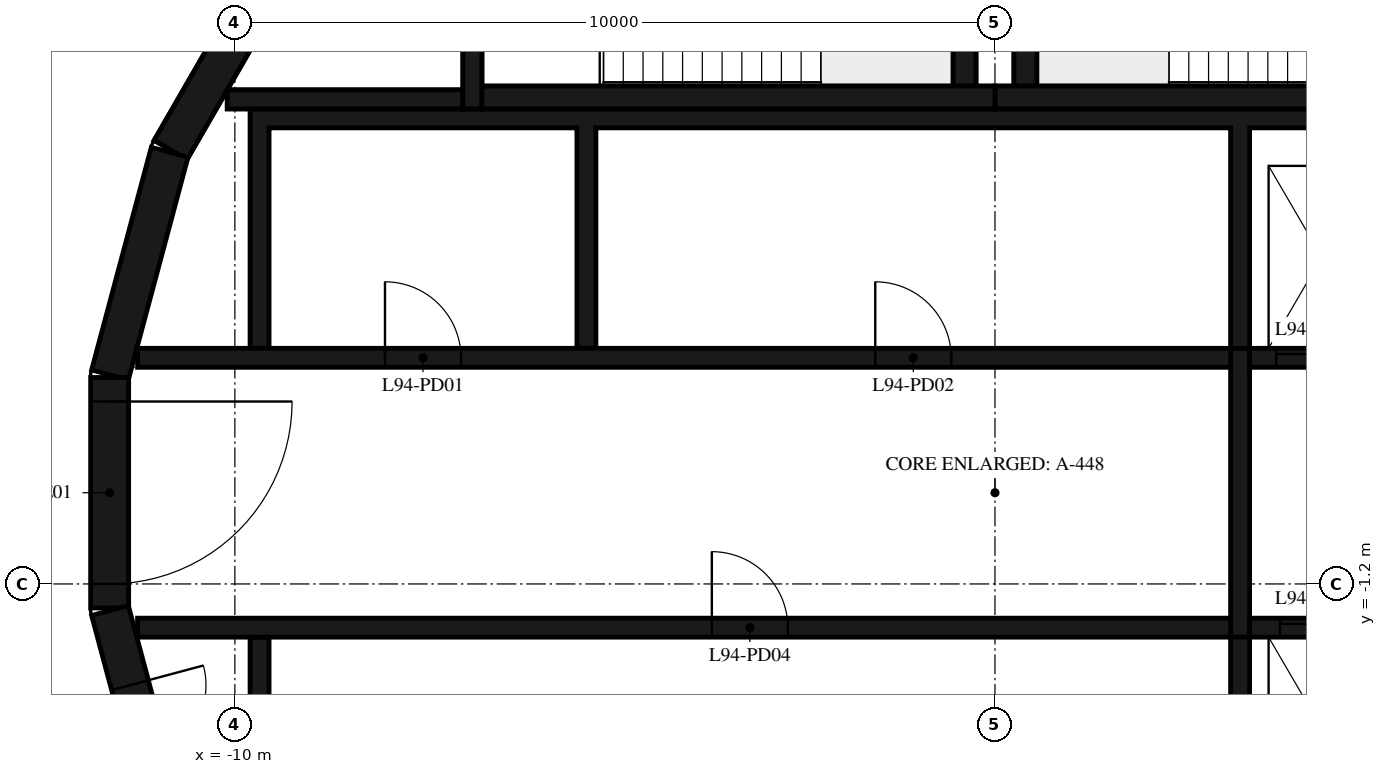
"""IFC4 building model, lengths in metres.
Left out: names, types, materials, properties, quantities, classifications, styles, units other than length and angle.
Written with IfcOpenShell. Run it as: python <this file> out.ifc"""

import sys

from ifc_helpers import new_model, si_unit, direction, frame, frame_2d, origin, place, context, subcontext, project, spatial, polyline, rectangle, outline, extrude, element, fill, save


model = new_model("IFC4")
c1 = context("Model", 3, precision=1e-05, world=origin(), true_north=direction((0.0, 1.0)))
c2 = subcontext(c1, "Body", "Model", "MODEL_VIEW")
j1 = project(units=[si_unit("LENGTHUNIT", "METRE"), si_unit("PLANEANGLEUNIT", "RADIAN")], contexts=[c1])
p1 = place(None, origin())
s1 = spatial("IfcSite", under=j1, at=p1, CompositionType="ELEMENT")
p2 = place(p1, origin())
s2 = spatial("IfcBuilding", under=s1, at=p2, CompositionType="ELEMENT")
p3 = place(p2, frame((0.0, 0.0, 366.2)))
s3 = spatial("IfcBuildingStorey", under=s2, at=p3, CompositionType="ELEMENT", Elevation=366.2)
for number, where, z_axis, x_axis in (
    (1, (-9.329, 7.137, 0.0), (0.0, 0.0, 1.0), (-0.5, -0.866, 0.0)),
    (2, (-10.858, 4.479, 0.0), (0.0, 0.0, 1.0), (-0.259, -0.966, 0.0)),
):
    element("IfcWall", number, at=place(p3, frame(where, z_axis=z_axis, x_axis=x_axis)), inside=s3, PredefinedType="SHEAR", context=c2, shape_type="SweptSolid", body=[
        extrude(rectangle(XDim=3.033, YDim=0.5, at=frame_2d((1.516, 0.0))), origin(), (0.0, 0.0, 1.0), 4.8),
    ])
p4 = place(p3, frame((-11.647, 1.516, 0.0), z_axis=(0.0, 0.0, 1.0), x_axis=(0.0, -1.0, 0.0)))
e3 = element("IfcWall", 3, at=p4, inside=s3, PredefinedType="SHEAR", context=c2, shape_type="SweptSolid", body=[
    extrude(rectangle(XDim=3.033, YDim=0.5, at=frame_2d((1.516, 0.0))), origin(), (0.0, 0.0, 1.0), 4.8),
])
p5 = place(p4, frame((0.316, 0.0, 0.0)))
e4 = element("IfcOpeningElement", 4, at=p5, cuts=e3, PredefinedType="OPENING", context=c2, shape_type="SweptSolid", body=[
    extrude(rectangle(XDim=2.4, YDim=2.1, at=frame_2d((1.2, 1.05))), frame((0.0, 0.26, 0.0), z_axis=(0.0, -1.0, 0.0), x_axis=(1.0, 0.0, 0.0)), (0.0, 0.0, 1.0), 0.52),
])
p6 = place(p3, frame((-11.643, -1.55, 0.0), z_axis=(0.0, 0.0, 1.0), x_axis=(0.258734743916, -0.965948410781, 0.0)))
e5 = element("IfcWall", 5, at=p6, inside=s3, PredefinedType="SHEAR", context=c2, shape_type="SweptSolid", body=[
    extrude(rectangle(XDim=3.033, YDim=0.5, at=frame_2d((1.516, 0.0))), origin(), (0.0, 0.0, 1.0), 4.8),
])
p7 = place(p6, frame((1.016, 0.0, 0.0)))
e6 = element("IfcOpeningElement", 6, at=p7, cuts=e5, PredefinedType="OPENING", context=c2, shape_type="SweptSolid", body=[
    extrude(rectangle(XDim=1.0, YDim=2.4, at=frame_2d((0.5, 1.2))), frame((0.0, 0.26, 0.0), z_axis=(0.0, -1.0, 0.0), x_axis=(1.0, 0.0, 0.0)), (0.0, 0.0, 1.0), 0.52),
])
p8 = place(p3, frame((0.0, 5.2, 0.0), z_axis=(0.0, 0.0, 1.0), x_axis=(1.0, 0.0, 0.0)))
e7 = element("IfcWall", 7, at=p8, inside=s3, PredefinedType="SHEAR", context=c2, shape_type="SweptSolid", body=[
    extrude(rectangle(XDim=6.75, YDim=0.3, at=frame_2d((3.375, 0.0))), origin(), (0.0, 0.0, 1.0), 4.8),
])
p9 = place(p3, frame((0.4, 5.35, 0.0), z_axis=(0.0, 0.0, 1.0), x_axis=(0.0, 1.0, 0.0)))
e8 = element("IfcWall", 8, at=p9, inside=s3, PredefinedType="SHEAR", context=c2, shape_type="SweptSolid", body=[
    extrude(rectangle(XDim=3.32, YDim=0.3, at=frame_2d((1.66, 0.0))), origin(), (0.0, 0.0, 1.0), 4.8),
])
p10 = place(p3, frame((-6.75, 5.2, 0.0), z_axis=(0.0, 0.0, 1.0), x_axis=(1.0, 0.0, 0.0)))
e9 = element("IfcWall", 9, at=p10, inside=s3, PredefinedType="SHEAR", context=c2, shape_type="SweptSolid", body=[
    extrude(rectangle(XDim=6.75, YDim=0.3, at=frame_2d((3.375, 0.0))), origin(), (0.0, 0.0, 1.0), 4.8),
])
p11 = place(p3, frame((-0.4, 5.35, 0.0), z_axis=(0.0, 0.0, 1.0), x_axis=(0.0, 1.0, 0.0)))
e10 = element("IfcWall", 10, at=p11, inside=s3, PredefinedType="SHEAR", context=c2, shape_type="SweptSolid", body=[
    extrude(rectangle(XDim=3.32, YDim=0.3, at=frame_2d((1.66, 0.0))), origin(), (0.0, 0.0, 1.0), 4.8),
])
p12 = place(p3, frame((-6.875, 8.97, 0.0), z_axis=(0.0, 0.0, 1.0), x_axis=(0.0, -1.0, 0.0)))
e11 = element("IfcWall", 11, at=p12, inside=s3, PredefinedType="SHEAR", context=c2, shape_type="SweptSolid", body=[
    extrude(rectangle(XDim=3.92, YDim=0.25, at=frame_2d((1.96, 0.0))), origin(), (0.0, 0.0, 1.0), 4.8),
])
p13 = place(p12, frame((1.61, 0.0, 0.0)))
e12 = element("IfcOpeningElement", 12, at=p13, cuts=e11, PredefinedType="OPENING", context=c2, shape_type="SweptSolid", body=[
    extrude(rectangle(XDim=1.2, YDim=2.1, at=frame_2d((0.6, 1.05))), frame((0.0, 0.135, 0.0), z_axis=(0.0, -1.0, 0.0), x_axis=(1.0, 0.0, 0.0)), (0.0, 0.0, 1.0), 0.27),
])
p14 = place(p3, frame((-7.0, 5.175, 0.0), z_axis=(0.0, 0.0, 1.0), x_axis=(-1.0, 0.0, 0.0)))
e13 = element("IfcWall", 13, at=p14, inside=s3, PredefinedType="SHEAR", context=c2, shape_type="SweptSolid", body=[
    extrude(rectangle(XDim=3.1, YDim=0.25, at=frame_2d((1.55, 0.0))), origin(), (0.0, 0.0, 1.0), 4.8),
])
p15 = place(p3, origin())
e14 = element("IfcWall", 14, at=p15, inside=s3, PredefinedType="SHEAR", context=c2, shape_type="SweptSolid", body=[
    extrude(outline(polyline([(-9.8, 1.9), (-9.55, 1.9), (-9.55, 4.8), (-5.5, 4.8), (-5.5, 1.9), (-5.25, 1.9), (-5.25, 4.8), (3.1, 4.8), (3.1, 1.9), (3.35, 1.9), (3.35, 4.8), (5.25, 4.8), (5.25, 1.9), (5.5, 1.9), (5.5, 4.8), (7.4, 4.8), (7.4, 1.9), (7.65, 1.9), (7.65, 4.8), (9.55, 4.8), (9.55, 1.9), (9.8, 1.9), (9.8, 4.8), (9.8, 5.05), (-9.8, 5.05), (-9.8, 4.8), (-9.8, 1.9)])), origin(), (0.0, 0.0, 1.0), 4.8),
])
p16 = place(p3, origin())
e15 = element("IfcWall", 15, at=p16, inside=s3, PredefinedType="SHEAR", context=c2, shape_type="SweptSolid", body=[
    extrude(outline(polyline([(9.8, -4.8), (9.8, -1.9), (9.55, -1.9), (9.55, -4.8), (7.65, -4.8), (7.65, -1.9), (7.4, -1.9), (7.4, -4.8), (5.5, -4.8), (5.5, -1.9), (5.25, -1.9), (5.25, -4.8), (3.35, -4.8), (3.35, -1.9), (3.1, -1.9), (3.1, -4.8), (-9.55, -4.8), (-9.55, -1.9), (-9.8, -1.9), (-9.8, -4.8), (-9.8, -5.05), (9.8, -5.05), (9.8, -4.8)])), origin(), (0.0, 0.0, 1.0), 4.8),
])
p17 = place(p3, frame((-11.28, 1.775, 0.0), z_axis=(0.0, 0.0, 1.0), x_axis=(1.0, 0.0, 0.0)))
e16 = element("IfcWall", 16, at=p17, inside=s3, PredefinedType="SHEAR", context=c2, shape_type="SweptSolid", body=[
    extrude(rectangle(XDim=14.38, YDim=0.25, at=frame_2d((7.19, 0.0))), origin(), (0.0, 0.0, 1.0), 4.8),
])
p18 = place(p17, frame((3.255, 0.0, 0.0)))
e17 = element("IfcOpeningElement", 17, at=p18, cuts=e16, PredefinedType="OPENING", context=c2, shape_type="SweptSolid", body=[
    extrude(rectangle(XDim=1.0, YDim=2.4, at=frame_2d((0.5, 1.2))), frame((0.0, 0.135, 0.0), z_axis=(0.0, -1.0, 0.0), x_axis=(1.0, 0.0, 0.0)), (0.0, 0.0, 1.0), 0.27),
])
p19 = place(p17, frame((9.705, 0.0, 0.0)))
e18 = element("IfcOpeningElement", 18, at=p19, cuts=e16, PredefinedType="OPENING", context=c2, shape_type="SweptSolid", body=[
    extrude(rectangle(XDim=1.0, YDim=2.4, at=frame_2d((0.5, 1.2))), frame((0.0, 0.135, 0.0), z_axis=(0.0, -1.0, 0.0), x_axis=(1.0, 0.0, 0.0)), (0.0, 0.0, 1.0), 0.27),
])
p20 = place(p3, frame((3.35, 1.775, 0.0), z_axis=(0.0, 0.0, 1.0), x_axis=(1.0, 0.0, 0.0)))
e19 = element("IfcWall", 19, at=p20, inside=s3, PredefinedType="SHEAR", context=c2, shape_type="SweptSolid", body=[
    extrude(rectangle(XDim=7.93, YDim=0.25, at=frame_2d((3.965, 0.0))), origin(), (0.0, 0.0, 1.0), 4.8),
])
p21 = place(p20, frame((0.35, 0.0, 0.0)))
e20 = element("IfcOpeningElement", 20, at=p21, cuts=e19, PredefinedType="OPENING", context=c2, shape_type="SweptSolid", body=[
    extrude(rectangle(XDim=1.2, YDim=2.4, at=frame_2d((0.6, 1.2))), frame((0.0, 0.135, 0.0), z_axis=(0.0, -1.0, 0.0), x_axis=(1.0, 0.0, 0.0)), (0.0, 0.0, 1.0), 0.27),
])
p22 = place(p20, frame((2.5, 0.0, 0.0)))
e21 = element("IfcOpeningElement", 21, at=p22, cuts=e19, PredefinedType="OPENING", context=c2, shape_type="SweptSolid", body=[
    extrude(rectangle(XDim=1.2, YDim=2.4, at=frame_2d((0.6, 1.2))), frame((0.0, 0.135, 0.0), z_axis=(0.0, -1.0, 0.0), x_axis=(1.0, 0.0, 0.0)), (0.0, 0.0, 1.0), 0.27),
])
p23 = place(p20, frame((4.75, 0.0, 0.0)))
e22 = element("IfcOpeningElement", 22, at=p23, cuts=e19, PredefinedType="OPENING", context=c2, shape_type="SweptSolid", body=[
    extrude(rectangle(XDim=1.0, YDim=2.4, at=frame_2d((0.5, 1.2))), frame((0.0, 0.135, 0.0), z_axis=(0.0, -1.0, 0.0), x_axis=(1.0, 0.0, 0.0)), (0.0, 0.0, 1.0), 0.27),
])
p24 = place(p3, frame((-11.28, -1.775, 0.0), z_axis=(0.0, 0.0, 1.0), x_axis=(1.0, 0.0, 0.0)))
e23 = element("IfcWall", 23, at=p24, inside=s3, PredefinedType="SHEAR", context=c2, shape_type="SweptSolid", body=[
    extrude(rectangle(XDim=14.38, YDim=0.25, at=frame_2d((7.19, 0.0))), origin(), (0.0, 0.0, 1.0), 4.8),
])
p25 = place(p24, frame((7.555, 0.0, 0.0)))
e24 = element("IfcOpeningElement", 24, at=p25, cuts=e23, PredefinedType="OPENING", context=c2, shape_type="SweptSolid", body=[
    extrude(rectangle(XDim=1.0, YDim=2.4, at=frame_2d((0.5, 1.2))), frame((0.0, 0.135, 0.0), z_axis=(0.0, -1.0, 0.0), x_axis=(1.0, 0.0, 0.0)), (0.0, 0.0, 1.0), 0.27),
])
p26 = place(p3, frame((3.35, -1.775, 0.0), z_axis=(0.0, 0.0, 1.0), x_axis=(1.0, 0.0, 0.0)))
e25 = element("IfcWall", 25, at=p26, inside=s3, PredefinedType="SHEAR", context=c2, shape_type="SweptSolid", body=[
    extrude(rectangle(XDim=7.93, YDim=0.25, at=frame_2d((3.965, 0.0))), origin(), (0.0, 0.0, 1.0), 4.8),
])
p27 = place(p26, frame((0.4, 0.0, 0.0)))
e26 = element("IfcOpeningElement", 26, at=p27, cuts=e25, PredefinedType="OPENING", context=c2, shape_type="SweptSolid", body=[
    extrude(rectangle(XDim=1.1, YDim=2.4, at=frame_2d((0.55, 1.2))), frame((0.0, 0.135, 0.0), z_axis=(0.0, -1.0, 0.0), x_axis=(1.0, 0.0, 0.0)), (0.0, 0.0, 1.0), 0.27),
])
p28 = place(p26, frame((2.55, 0.0, 0.0)))
e27 = element("IfcOpeningElement", 27, at=p28, cuts=e25, PredefinedType="OPENING", context=c2, shape_type="SweptSolid", body=[
    extrude(rectangle(XDim=1.1, YDim=2.4, at=frame_2d((0.55, 1.2))), frame((0.0, 0.135, 0.0), z_axis=(0.0, -1.0, 0.0), x_axis=(1.0, 0.0, 0.0)), (0.0, 0.0, 1.0), 0.27),
])
p29 = place(p26, frame((4.7, 0.0, 0.0)))
e28 = element("IfcOpeningElement", 28, at=p29, cuts=e25, PredefinedType="OPENING", context=c2, shape_type="SweptSolid", body=[
    extrude(rectangle(XDim=1.1, YDim=2.4, at=frame_2d((0.55, 1.2))), frame((0.0, 0.135, 0.0), z_axis=(0.0, -1.0, 0.0), x_axis=(1.0, 0.0, 0.0)), (0.0, 0.0, 1.0), 0.27),
])
p30 = place(p3, frame((3.225, -1.9, 0.0), z_axis=(0.0, 0.0, 1.0), x_axis=(0.0, 1.0, 0.0)))
e29 = element("IfcWall", 29, at=p30, inside=s3, PredefinedType="SHEAR", context=c2, shape_type="SweptSolid", body=[
    extrude(rectangle(XDim=3.8, YDim=0.25, at=frame_2d((1.9, 0.0))), origin(), (0.0, 0.0, 1.0), 4.8),
])
p31 = place(p3, frame((0.0, 5.2, 5.2), z_axis=(0.0, 0.0, 1.0), x_axis=(1.0, 0.0, 0.0)))
e30 = element("IfcWall", 30, at=p31, inside=s3, PredefinedType="SHEAR", context=c2, shape_type="SweptSolid", body=[
    extrude(rectangle(XDim=6.75, YDim=0.3, at=frame_2d((3.375, 0.0))), origin(), (0.0, 0.0, 1.0), 2.8),
])
p32 = place(p3, frame((0.4, 5.35, 5.2), z_axis=(0.0, 0.0, 1.0), x_axis=(0.0, 1.0, 0.0)))
e31 = element("IfcWall", 31, at=p32, inside=s3, PredefinedType="SHEAR", context=c2, shape_type="SweptSolid", body=[
    extrude(rectangle(XDim=3.32, YDim=0.3, at=frame_2d((1.66, 0.0))), origin(), (0.0, 0.0, 1.0), 2.8),
])
p33 = place(p3, frame((-6.75, 5.2, 5.2), z_axis=(0.0, 0.0, 1.0), x_axis=(1.0, 0.0, 0.0)))
e32 = element("IfcWall", 32, at=p33, inside=s3, PredefinedType="SHEAR", context=c2, shape_type="SweptSolid", body=[
    extrude(rectangle(XDim=6.75, YDim=0.3, at=frame_2d((3.375, 0.0))), origin(), (0.0, 0.0, 1.0), 2.8),
])
p34 = place(p3, frame((-0.4, 5.35, 5.2), z_axis=(0.0, 0.0, 1.0), x_axis=(0.0, 1.0, 0.0)))
e33 = element("IfcWall", 33, at=p34, inside=s3, PredefinedType="SHEAR", context=c2, shape_type="SweptSolid", body=[
    extrude(rectangle(XDim=3.32, YDim=0.3, at=frame_2d((1.66, 0.0))), origin(), (0.0, 0.0, 1.0), 2.8),
])
p35 = place(p3, frame((-6.875, 8.97, 5.2), z_axis=(0.0, 0.0, 1.0), x_axis=(0.0, -1.0, 0.0)))
e34 = element("IfcWall", 34, at=p35, inside=s3, PredefinedType="SHEAR", context=c2, shape_type="SweptSolid", body=[
    extrude(rectangle(XDim=3.92, YDim=0.25, at=frame_2d((1.96, 0.0))), origin(), (0.0, 0.0, 1.0), 2.8),
])
p36 = place(p35, frame((1.61, 0.0, 0.0)))
e35 = element("IfcOpeningElement", 35, at=p36, cuts=e34, PredefinedType="OPENING", context=c2, shape_type="SweptSolid", body=[
    extrude(rectangle(XDim=1.2, YDim=2.1, at=frame_2d((0.6, 1.05))), frame((0.0, 0.135, 0.0), z_axis=(0.0, -1.0, 0.0), x_axis=(1.0, 0.0, 0.0)), (0.0, 0.0, 1.0), 0.27),
])
p37 = place(p3, frame((-7.0, 5.175, 5.2), z_axis=(0.0, 0.0, 1.0), x_axis=(-1.0, 0.0, 0.0)))
e36 = element("IfcWall", 36, at=p37, inside=s3, PredefinedType="SHEAR", context=c2, shape_type="SweptSolid", body=[
    extrude(rectangle(XDim=3.1, YDim=0.25, at=frame_2d((1.55, 0.0))), origin(), (0.0, 0.0, 1.0), 2.8),
])
p38 = place(p3, frame((-9.329, 7.137, 5.2), z_axis=(0.0, 0.0, 1.0), x_axis=(-0.500087131594, -0.865975092491, 0.0)))
e37 = element("IfcWall", 37, at=p38, inside=s3, PredefinedType="SHEAR", context=c2, shape_type="SweptSolid", body=[
    extrude(rectangle(XDim=3.033, YDim=0.5, at=frame_2d((1.516, 0.0))), origin(), (0.0, 0.0, 1.0), 2.8),
])
p39 = place(p5, origin())
e38 = element("IfcDoor", 38, at=p39, inside=s3, OperationType="DOUBLE_DOOR_SINGLE_SWING", PredefinedType="DOOR", context=c2, shape_type="SweptSolid", body=[
    extrude(rectangle(XDim=2.4, YDim=2.1, at=frame_2d((1.2, 1.05))), frame((0.0, 0.025, 0.0), z_axis=(0.0, -1.0, 0.0), x_axis=(1.0, 0.0, 0.0)), (0.0, 0.0, 1.0), 0.05),
])
fill(e4, e38)
p40 = place(p21, origin())
e39 = element("IfcDoor", 39, at=p40, inside=s3, OperationType="DOUBLE_DOOR_SLIDING", PredefinedType="DOOR", context=c2, shape_type="SweptSolid", body=[
    extrude(rectangle(XDim=1.2, YDim=2.4, at=frame_2d((0.6, 1.2))), frame((0.0, 0.025, 0.0), z_axis=(0.0, -1.0, 0.0), x_axis=(1.0, 0.0, 0.0)), (0.0, 0.0, 1.0), 0.05),
])
fill(e20, e39)
p41 = place(p27, origin())
e40 = element("IfcDoor", 40, at=p41, inside=s3, OperationType="DOUBLE_DOOR_SLIDING", PredefinedType="DOOR", context=c2, shape_type="SweptSolid", body=[
    extrude(rectangle(XDim=1.1, YDim=2.4, at=frame_2d((0.55, 1.2))), frame((0.0, 0.025, 0.0), z_axis=(0.0, -1.0, 0.0), x_axis=(1.0, 0.0, 0.0)), (0.0, 0.0, 1.0), 0.05),
])
fill(e26, e40)
p42 = place(p18, origin())
e41 = element("IfcDoor", 41, at=p42, inside=s3, OperationType="SINGLE_SWING_RIGHT", PredefinedType="DOOR", context=c2, shape_type="SweptSolid", body=[
    extrude(rectangle(XDim=1.0, YDim=2.4, at=frame_2d((0.5, 1.2))), frame((0.0, 0.025, 0.0), z_axis=(0.0, -1.0, 0.0), x_axis=(1.0, 0.0, 0.0)), (0.0, 0.0, 1.0), 0.05),
])
fill(e17, e41)
p43 = place(p19, origin())
e42 = element("IfcDoor", 42, at=p43, inside=s3, OperationType="SINGLE_SWING_LEFT", PredefinedType="DOOR", context=c2, shape_type="SweptSolid", body=[
    extrude(rectangle(XDim=1.0, YDim=2.4, at=frame_2d((0.5, 1.2))), frame((0.0, 0.025, 0.0), z_axis=(0.0, -1.0, 0.0), x_axis=(1.0, 0.0, 0.0)), (0.0, 0.0, 1.0), 0.05),
])
fill(e18, e42)
p44 = place(p25, origin())
e43 = element("IfcDoor", 43, at=p44, inside=s3, OperationType="SINGLE_SWING_LEFT", PredefinedType="DOOR", context=c2, shape_type="SweptSolid", body=[
    extrude(rectangle(XDim=1.0, YDim=2.4, at=frame_2d((0.5, 1.2))), frame((0.0, 0.025, 0.0), z_axis=(0.0, -1.0, 0.0), x_axis=(1.0, 0.0, 0.0)), (0.0, 0.0, 1.0), 0.05),
])
fill(e24, e43)
p45 = place(p7, origin())
e44 = element("IfcDoor", 44, at=p45, inside=s3, OperationType="SINGLE_SWING_RIGHT", PredefinedType="DOOR", context=c2, shape_type="SweptSolid", body=[
    extrude(rectangle(XDim=1.0, YDim=2.4, at=frame_2d((0.5, 1.2))), frame((0.0, 0.025, 0.0), z_axis=(0.0, -1.0, 0.0), x_axis=(1.0, 0.0, 0.0)), (0.0, 0.0, 1.0), 0.05),
])
fill(e6, e44)
save(model, sys.argv[1])
